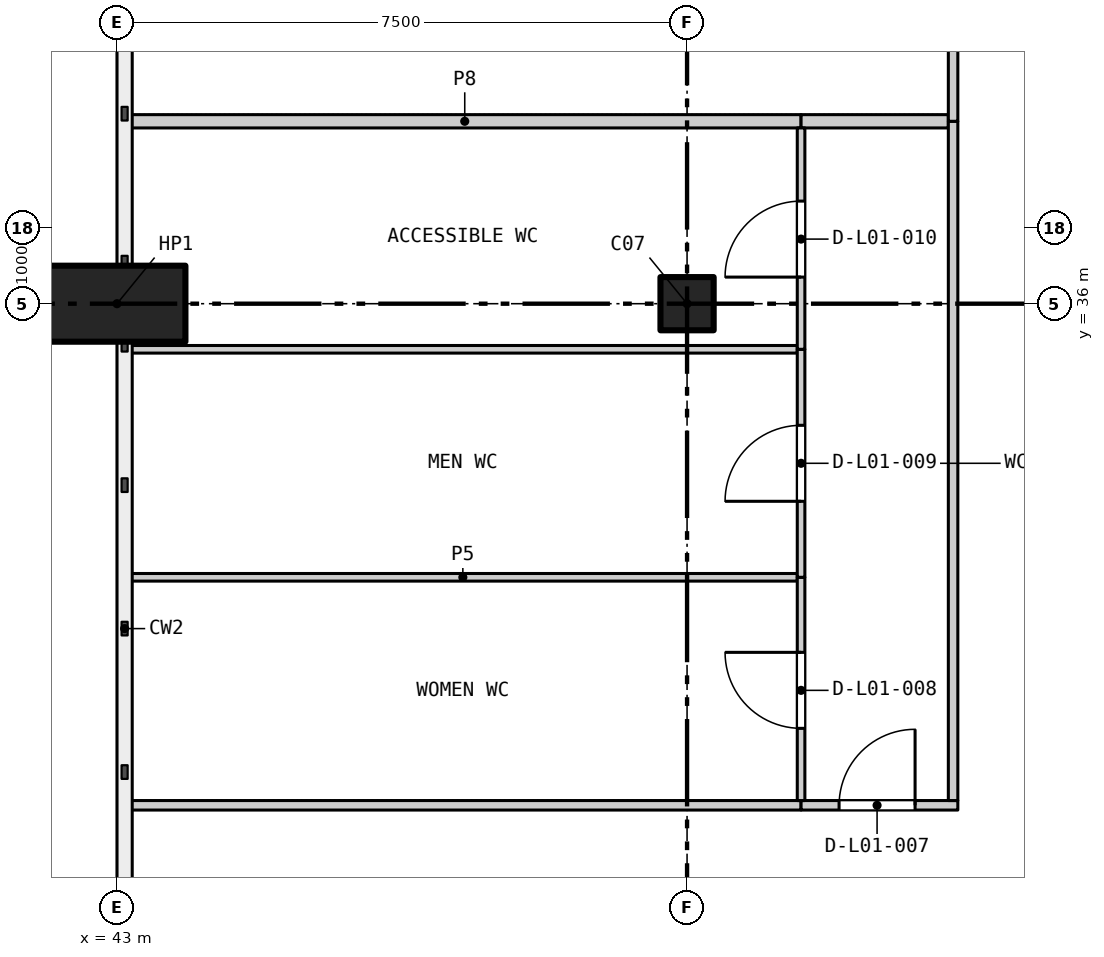
"""IFC4 building model, lengths in metres.
Left out: names, types, materials, properties, quantities, classifications, styles, units other than length and angle.
Written with IfcOpenShell. Run it as: python <this file> out.ifc"""

import sys

from ifc_helpers import new_model, si_unit, direction, frame, frame_2d, origin, origin_2d, place, context, subcontext, project, spatial, rectangle, extrude, element, fill, save


model = new_model("IFC4")
c1 = context("Model", 3, precision=1e-05, world=origin(), true_north=direction((0.0, 1.0)))
c2 = subcontext(c1, "Body", "Model", "MODEL_VIEW")
j1 = project(units=[si_unit("LENGTHUNIT", "METRE"), si_unit("PLANEANGLEUNIT", "RADIAN")], contexts=[c1])
p1 = place(None, origin())
s1 = spatial("IfcSite", under=j1, at=p1, CompositionType="ELEMENT")
p2 = place(p1, origin())
s2 = spatial("IfcBuilding", under=s1, at=p2, CompositionType="ELEMENT")
p3 = place(p2, frame((0.0, 0.0, 6.0)))
s3 = spatial("IfcBuildingStorey", under=s2, at=p3, CompositionType="ELEMENT", Elevation=6.0)
p4 = place(p3, frame((50.5, 36.0, 0.0), z_axis=(0.0, 0.0, 1.0), x_axis=(1.0, 0.0, 0.0)))
e1 = element("IfcColumn", 1, at=p4, inside=s3, PredefinedType="COLUMN", context=c2, shape_type="SweptSolid", body=[
    extrude(rectangle(XDim=0.7, YDim=0.7, at=origin_2d()), origin(), (0.0, 0.0, 1.0), 4.2),
])
p5 = place(p3, frame((43.0, 36.0, 0.0), z_axis=(0.0, 0.0, 1.0), x_axis=(1.0, 0.0, 0.0)))
e2 = element("IfcColumn", 2, at=p5, inside=s3, PredefinedType="COLUMN", context=c2, shape_type="SweptSolid", body=[
    extrude(rectangle(XDim=1.8, YDim=1.0, at=origin_2d()), origin(), (0.0, 0.0, 1.0), 4.2),
])
p6 = place(p3, frame((43.15, 29.4, 0.0), z_axis=(0.0, 0.0, 1.0), x_axis=(1.0, 0.0, 0.0)))
e3 = element("IfcWall", 3, at=p6, inside=s3, PredefinedType="PARTITIONING", context=c2, shape_type="SweptSolid", body=[
    extrude(rectangle(XDim=8.85, YDim=0.125, at=frame_2d((4.425, 0.0))), origin(), (0.0, 0.0, 1.0), 4.0),
])
p7 = place(p3, frame((52.0, 29.4, 0.0), z_axis=(0.0, 0.0, 1.0), x_axis=(1.0, 0.0, 0.0)))
e4 = element("IfcWall", 4, at=p7, inside=s3, PredefinedType="PARTITIONING", context=c2, shape_type="SweptSolid", body=[
    extrude(rectangle(XDim=2.062, YDim=0.125, at=frame_2d((1.031, 0.0))), origin(), (0.0, 0.0, 1.0), 4.0),
])
p8 = place(p7, frame((0.5, 0.0, 0.0)))
e5 = element("IfcOpeningElement", 5, at=p8, cuts=e4, PredefinedType="OPENING", context=c2, shape_type="SweptSolid", body=[
    extrude(rectangle(XDim=1.0, YDim=2.1, at=frame_2d((0.5, 1.05))), frame((0.0, 0.073, 0.0), z_axis=(0.0, -1.0, 0.0), x_axis=(1.0, 0.0, 0.0)), (0.0, 0.0, 1.0), 0.145),
])
for number, where, z_axis, x_axis in (
    (6, (43.15, 32.4, 0.0), (0.0, 0.0, 1.0), (1.0, 0.0, 0.0)),
    (7, (43.15, 35.4, 0.0), (0.0, 0.0, 1.0), (1.0, 0.0, 0.0)),
):
    element("IfcWall", number, at=place(p3, frame(where, z_axis=z_axis, x_axis=x_axis)), inside=s3, PredefinedType="PARTITIONING", context=c2, shape_type="SweptSolid", body=[
        extrude(rectangle(XDim=8.8, YDim=0.1, at=frame_2d((4.4, 0.0))), origin(), (0.0, 0.0, 1.0), 4.0),
    ])
p9 = place(p3, frame((43.15, 38.4, 0.0), z_axis=(0.0, 0.0, 1.0), x_axis=(1.0, 0.0, 0.0)))
e8 = element("IfcWall", 8, at=p9, inside=s3, PredefinedType="PARTITIONING", context=c2, shape_type="SweptSolid", body=[
    extrude(rectangle(XDim=8.85, YDim=0.175, at=frame_2d((4.425, 0.0))), origin(), (0.0, 0.0, 1.0), 4.0),
])
p10 = place(p3, frame((52.0, 38.4, 0.0), z_axis=(0.0, 0.0, 1.0), x_axis=(1.0, 0.0, 0.0)))
e9 = element("IfcWall", 9, at=p10, inside=s3, PredefinedType="PARTITIONING", context=c2, shape_type="SweptSolid", body=[
    extrude(rectangle(XDim=1.938, YDim=0.175, at=frame_2d((0.969, 0.0))), origin(), (0.0, 0.0, 1.0), 4.0),
])
p11 = place(p3, frame((52.0, 29.462, 0.0), z_axis=(0.0, 0.0, 1.0), x_axis=(0.0, 1.0, 0.0)))
e10 = element("IfcWall", 10, at=p11, inside=s3, PredefinedType="PARTITIONING", context=c2, shape_type="SweptSolid", body=[
    extrude(rectangle(XDim=2.938, YDim=0.1, at=frame_2d((1.469, 0.0))), origin(), (0.0, 0.0, 1.0), 4.0),
])
p12 = place(p11, frame((0.95, 0.0, 0.0)))
e11 = element("IfcOpeningElement", 11, at=p12, cuts=e10, PredefinedType="OPENING", context=c2, shape_type="SweptSolid", body=[
    extrude(rectangle(XDim=1.0, YDim=2.1, at=frame_2d((0.5, 1.05))), frame((0.0, 0.06, 0.0), z_axis=(0.0, -1.0, 0.0), x_axis=(1.0, 0.0, 0.0)), (0.0, 0.0, 1.0), 0.12),
])
p13 = place(p3, frame((52.0, 32.4, 0.0), z_axis=(0.0, 0.0, 1.0), x_axis=(0.0, 1.0, 0.0)))
e12 = element("IfcWall", 12, at=p13, inside=s3, PredefinedType="PARTITIONING", context=c2, shape_type="SweptSolid", body=[
    extrude(rectangle(XDim=3.0, YDim=0.1, at=frame_2d((1.5, 0.0))), origin(), (0.0, 0.0, 1.0), 4.0),
])
p14 = place(p13, frame((1.0, 0.0, 0.0)))
e13 = element("IfcOpeningElement", 13, at=p14, cuts=e12, PredefinedType="OPENING", context=c2, shape_type="SweptSolid", body=[
    extrude(rectangle(XDim=1.0, YDim=2.1, at=frame_2d((0.5, 1.05))), frame((0.0, 0.06, 0.0), z_axis=(0.0, -1.0, 0.0), x_axis=(1.0, 0.0, 0.0)), (0.0, 0.0, 1.0), 0.12),
])
p15 = place(p3, frame((52.0, 35.4, 0.0), z_axis=(0.0, 0.0, 1.0), x_axis=(0.0, 1.0, 0.0)))
e14 = element("IfcWall", 14, at=p15, inside=s3, PredefinedType="PARTITIONING", context=c2, shape_type="SweptSolid", body=[
    extrude(rectangle(XDim=2.913, YDim=0.1, at=frame_2d((1.456, 0.0))), origin(), (0.0, 0.0, 1.0), 4.0),
])
p16 = place(p15, frame((0.95, 0.0, 0.0)))
e15 = element("IfcOpeningElement", 15, at=p16, cuts=e14, PredefinedType="OPENING", context=c2, shape_type="SweptSolid", body=[
    extrude(rectangle(XDim=1.0, YDim=2.1, at=frame_2d((0.5, 1.05))), frame((0.0, 0.06, 0.0), z_axis=(0.0, -1.0, 0.0), x_axis=(1.0, 0.0, 0.0)), (0.0, 0.0, 1.0), 0.12),
])
p17 = place(p3, frame((54.0, 29.462, 0.0), z_axis=(0.0, 0.0, 1.0), x_axis=(0.0, 1.0, 0.0)))
e16 = element("IfcWall", 16, at=p17, inside=s3, PredefinedType="PARTITIONING", context=c2, shape_type="SweptSolid", body=[
    extrude(rectangle(XDim=8.938, YDim=0.125, at=frame_2d((4.469, 0.0))), origin(), (0.0, 0.0, 1.0), 3.25),
])
p18 = place(p3, frame((54.0, 38.4, 0.0), z_axis=(0.0, 0.0, 1.0), x_axis=(0.0, 1.0, 0.0)))
e17 = element("IfcWall", 17, at=p18, inside=s3, PredefinedType="PARTITIONING", context=c2, shape_type="SweptSolid", body=[
    extrude(rectangle(XDim=21.0, YDim=0.125, at=frame_2d((10.5, 0.0))), origin(), (0.0, 0.0, 1.0), 3.25),
])
p19 = place(p18, frame((2.25, 0.0, 0.0)))
e18 = element("IfcOpeningElement", 18, at=p19, cuts=e17, PredefinedType="OPENING", context=c2, shape_type="SweptSolid", body=[
    extrude(rectangle(XDim=1.8, YDim=2.1, at=frame_2d((0.9, 1.05))), frame((0.0, 0.073, 0.0), z_axis=(0.0, -1.0, 0.0), x_axis=(1.0, 0.0, 0.0)), (0.0, 0.0, 1.0), 0.145),
])
p20 = place(p18, frame((16.95, 0.0, 0.0)))
e19 = element("IfcOpeningElement", 19, at=p20, cuts=e17, PredefinedType="OPENING", context=c2, shape_type="SweptSolid", body=[
    extrude(rectangle(XDim=1.8, YDim=2.1, at=frame_2d((0.9, 1.05))), frame((0.0, 0.073, 0.0), z_axis=(0.0, -1.0, 0.0), x_axis=(1.0, 0.0, 0.0)), (0.0, 0.0, 1.0), 0.145),
])
p21 = place(p8, origin())
e20 = element("IfcDoor", 20, at=p21, inside=s3, OperationType="SINGLE_SWING_RIGHT", PredefinedType="DOOR", context=c2, shape_type="SweptSolid", body=[
    extrude(rectangle(XDim=1.0, YDim=2.1, at=frame_2d((0.5, 1.05))), frame((0.0, 0.025, 0.0), z_axis=(0.0, -1.0, 0.0), x_axis=(1.0, 0.0, 0.0)), (0.0, 0.0, 1.0), 0.05),
])
fill(e5, e20)
p22 = place(p12, origin())
e21 = element("IfcDoor", 21, at=p22, inside=s3, OperationType="SINGLE_SWING_RIGHT", PredefinedType="DOOR", context=c2, shape_type="SweptSolid", body=[
    extrude(rectangle(XDim=1.0, YDim=2.1, at=frame_2d((0.5, 1.05))), frame((0.0, 0.025, 0.0), z_axis=(0.0, -1.0, 0.0), x_axis=(1.0, 0.0, 0.0)), (0.0, 0.0, 1.0), 0.05),
])
fill(e11, e21)
p23 = place(p14, origin())
e22 = element("IfcDoor", 22, at=p23, inside=s3, OperationType="SINGLE_SWING_LEFT", PredefinedType="DOOR", context=c2, shape_type="SweptSolid", body=[
    extrude(rectangle(XDim=1.0, YDim=2.1, at=frame_2d((0.5, 1.05))), frame((0.0, 0.025, 0.0), z_axis=(0.0, -1.0, 0.0), x_axis=(1.0, 0.0, 0.0)), (0.0, 0.0, 1.0), 0.05),
])
fill(e13, e22)
p24 = place(p16, origin())
e23 = element("IfcDoor", 23, at=p24, inside=s3, OperationType="SINGLE_SWING_LEFT", PredefinedType="DOOR", context=c2, shape_type="SweptSolid", body=[
    extrude(rectangle(XDim=1.0, YDim=2.1, at=frame_2d((0.5, 1.05))), frame((0.0, 0.025, 0.0), z_axis=(0.0, -1.0, 0.0), x_axis=(1.0, 0.0, 0.0)), (0.0, 0.0, 1.0), 0.05),
])
fill(e15, e23)
save(model, sys.argv[1])
